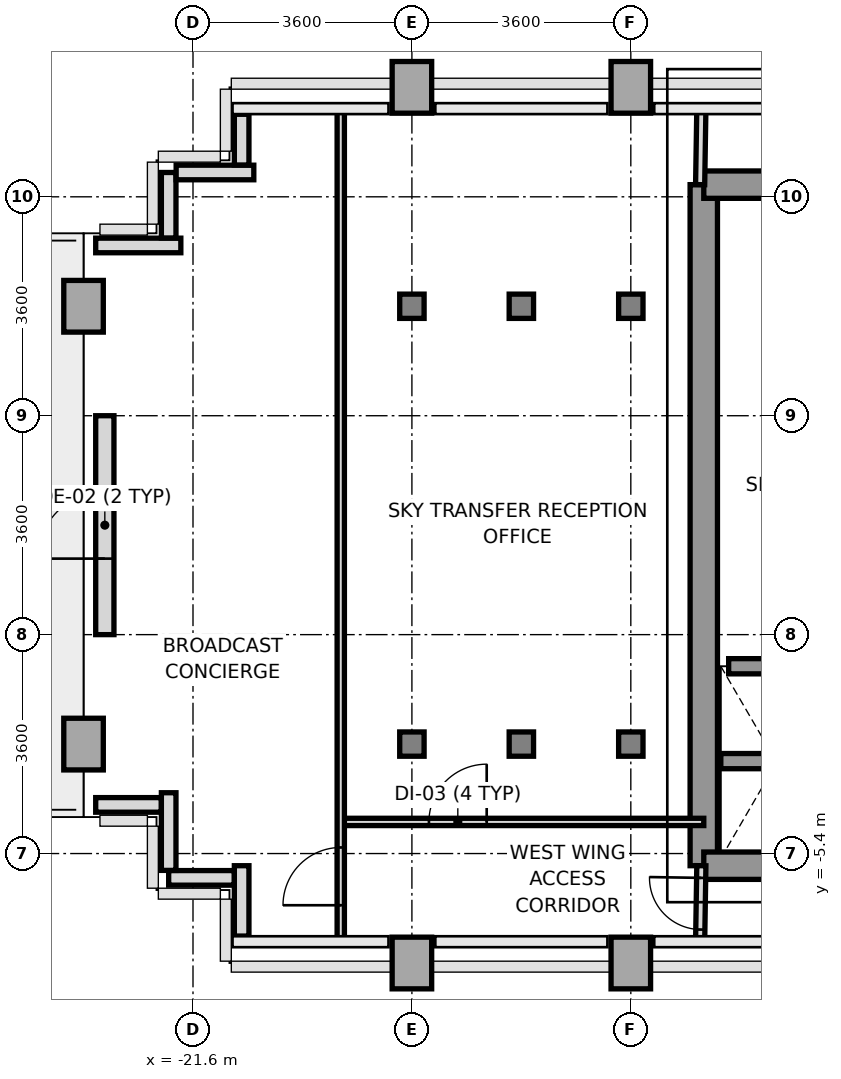
"""IFC4 building model, lengths in metres.
Left out: names, types, materials, properties, quantities, classifications, styles, units other than length and angle.
Written with IfcOpenShell. Run it as: python <this file> out.ifc"""

import sys

from ifc_helpers import new_model, si_unit, direction, frame, frame_2d, origin, origin_2d, place, context, subcontext, project, spatial, rectangle, i_section, extrude, source, transform, mapped, element, fill, save


model = new_model("IFC4")
c1 = context("Model", 3, precision=1e-05, world=origin(), true_north=direction((0.0, 1.0)))
c2 = subcontext(c1, "Body", "Model", "MODEL_VIEW")
j1 = project(units=[si_unit("LENGTHUNIT", "METRE"), si_unit("PLANEANGLEUNIT", "RADIAN")], contexts=[c1])
p1 = place(None, origin())
s1 = spatial("IfcSite", under=j1, at=p1, CompositionType="ELEMENT")
p2 = place(p1, origin())
s2 = spatial("IfcBuilding", under=s1, at=p2, CompositionType="ELEMENT")
p3 = place(p2, frame((0.0, 0.0, 93.0)))
s3 = spatial("IfcBuildingStorey", under=s2, at=p3, CompositionType="ELEMENT", Elevation=93.0)
m1 = source(origin(), c2, "Body", "SweptSolid", [
    extrude(rectangle(XDim=0.65, YDim=0.85, at=origin_2d()), origin(), (0.0, 0.0, 1.0), 4.0),
])
for number, where, z_axis, x_axis in (
    (1, (-23.4, -3.6, 0.0), (0.0, 0.0, 1.0), (1.0, 0.0, 0.0)),
    (2, (-23.4, 3.6, 0.0), (0.0, 0.0, 1.0), (1.0, 0.0, 0.0)),
    (3, (-18.0, -7.2, 0.0), (0.0, 0.0, 1.0), (1.0, 0.0, 0.0)),
):
    element("IfcColumn", number, at=place(p3, frame(where, z_axis=z_axis, x_axis=x_axis)), inside=s3, PredefinedType="COLUMN", context=c2, shape_type="MappedRepresentation", body=[
        mapped(m1, transform((0.0, 0.0, 0.0), x_axis=(1.0, 0.0, 0.0), y_axis=(0.0, 1.0, 0.0), z_axis=(0.0, 0.0, 1.0), scale=1.0)),
    ])
m2 = source(origin(), c2, "Body", "SweptSolid", [
    extrude(i_section(OverallWidth=0.401, OverallDepth=0.399, WebThickness=0.02, FlangeThickness=0.032, at=origin_2d()), origin(), (0.0, 0.0, 1.0), 4.0),
])
for number, where, z_axis, x_axis in (
    (4, (-18.0, -3.6, 0.0), (0.0, 0.0, 1.0), (1.0, 0.0, 0.0)),
    (5, (-18.0, 3.6, 0.0), (0.0, 0.0, 1.0), (1.0, 0.0, 0.0)),
):
    element("IfcColumn", number, at=place(p3, frame(where, z_axis=z_axis, x_axis=x_axis)), inside=s3, PredefinedType="COLUMN", context=c2, shape_type="MappedRepresentation", body=[
        mapped(m2, transform((0.0, 0.0, 0.0), x_axis=(1.0, 0.0, 0.0), y_axis=(0.0, 1.0, 0.0), z_axis=(0.0, 0.0, 1.0), scale=1.0)),
    ])
p4 = place(p3, frame((-18.0, 7.2, 0.0), z_axis=(0.0, 0.0, 1.0), x_axis=(1.0, 0.0, 0.0)))
e6 = element("IfcColumn", 6, at=p4, inside=s3, PredefinedType="COLUMN", context=c2, shape_type="MappedRepresentation", body=[
    mapped(m1, transform((0.0, 0.0, 0.0), x_axis=(1.0, 0.0, 0.0), y_axis=(0.0, 1.0, 0.0), z_axis=(0.0, 0.0, 1.0), scale=1.0)),
])
for number, where, z_axis, x_axis in (
    (7, (-16.2, -3.6, 0.0), (0.0, 0.0, 1.0), (1.0, 0.0, 0.0)),
    (8, (-16.2, 3.6, 0.0), (0.0, 0.0, 1.0), (1.0, 0.0, 0.0)),
):
    element("IfcColumn", number, at=place(p3, frame(where, z_axis=z_axis, x_axis=x_axis)), inside=s3, PredefinedType="COLUMN", context=c2, shape_type="MappedRepresentation", body=[
        mapped(m2, transform((0.0, 0.0, 0.0), x_axis=(1.0, 0.0, 0.0), y_axis=(0.0, 1.0, 0.0), z_axis=(0.0, 0.0, 1.0), scale=1.0)),
    ])
p5 = place(p3, frame((-14.4, -7.2, 0.0), z_axis=(0.0, 0.0, 1.0), x_axis=(1.0, 0.0, 0.0)))
e9 = element("IfcColumn", 9, at=p5, inside=s3, PredefinedType="COLUMN", context=c2, shape_type="MappedRepresentation", body=[
    mapped(m1, transform((0.0, 0.0, 0.0), x_axis=(1.0, 0.0, 0.0), y_axis=(0.0, 1.0, 0.0), z_axis=(0.0, 0.0, 1.0), scale=1.0)),
])
for number, where, z_axis, x_axis in (
    (10, (-14.4, -3.6, 0.0), (0.0, 0.0, 1.0), (1.0, 0.0, 0.0)),
    (11, (-14.4, 3.6, 0.0), (0.0, 0.0, 1.0), (1.0, 0.0, 0.0)),
):
    element("IfcColumn", number, at=place(p3, frame(where, z_axis=z_axis, x_axis=x_axis)), inside=s3, PredefinedType="COLUMN", context=c2, shape_type="MappedRepresentation", body=[
        mapped(m2, transform((0.0, 0.0, 0.0), x_axis=(1.0, 0.0, 0.0), y_axis=(0.0, 1.0, 0.0), z_axis=(0.0, 0.0, 1.0), scale=1.0)),
    ])
p6 = place(p3, frame((-14.4, 7.2, 0.0), z_axis=(0.0, 0.0, 1.0), x_axis=(1.0, 0.0, 0.0)))
e12 = element("IfcColumn", 12, at=p6, inside=s3, PredefinedType="COLUMN", context=c2, shape_type="MappedRepresentation", body=[
    mapped(m1, transform((0.0, 0.0, 0.0), x_axis=(1.0, 0.0, 0.0), y_axis=(0.0, 1.0, 0.0), z_axis=(0.0, 0.0, 1.0), scale=1.0)),
])
p7 = place(p3, frame((-23.05, -1.8, 0.0), z_axis=(0.0, 0.0, 1.0), x_axis=(0.0, 1.0, 0.0)))
e13 = element("IfcWall", 13, at=p7, inside=s3, PredefinedType="SOLIDWALL", context=c2, shape_type="SweptSolid", body=[
    extrude(rectangle(XDim=3.6, YDim=0.3, at=frame_2d((1.8, 0.0))), origin(), (0.0, 0.0, 1.0), 3.25),
])
p8 = place(p7, frame((1.25, 0.0, 0.0)))
e14 = element("IfcOpeningElement", 14, at=p8, cuts=e13, PredefinedType="OPENING", context=c2, shape_type="SweptSolid", body=[
    extrude(rectangle(XDim=1.1, YDim=2.3, at=frame_2d((0.55, 1.15))), frame((0.0, 0.16, 0.0), z_axis=(0.0, -1.0, 0.0), x_axis=(1.0, 0.0, 0.0)), (0.0, 0.0, 1.0), 0.32),
])
p9 = place(p3, frame((-20.8, -6.757, 0.0), z_axis=(0.0, 0.0, 1.0), x_axis=(0.0, 1.0, 0.0)))
e15 = element("IfcWall", 15, at=p9, inside=s3, PredefinedType="PARAPET", context=c2, shape_type="SweptSolid", body=[
    extrude(rectangle(XDim=1.157, YDim=0.24, at=frame_2d((0.579, 0.0))), origin(), (0.0, 0.0, 1.0), 1.15),
])
p10 = place(p3, frame((-20.923, -5.8, 0.0), z_axis=(0.0, 0.0, 1.0), x_axis=(-1.0, 0.0, 0.0)))
e16 = element("IfcWall", 16, at=p10, inside=s3, PredefinedType="PARAPET", context=c2, shape_type="SweptSolid", body=[
    extrude(rectangle(XDim=1.077, YDim=0.24, at=frame_2d((0.539, 0.0))), origin(), (0.0, 0.0, 1.0), 1.15),
])
p11 = place(p3, frame((-22.0, -5.677, 0.0), z_axis=(0.0, 0.0, 1.0), x_axis=(0.0, 1.0, 0.0)))
e17 = element("IfcWall", 17, at=p11, inside=s3, PredefinedType="PARAPET", context=c2, shape_type="SweptSolid", body=[
    extrude(rectangle(XDim=1.277, YDim=0.24, at=frame_2d((0.639, 0.0))), origin(), (0.0, 0.0, 1.0), 1.15),
])
p12 = place(p3, frame((-22.123, -4.6, 0.0), z_axis=(0.0, 0.0, 1.0), x_axis=(-1.0, 0.0, 0.0)))
e18 = element("IfcWall", 18, at=p12, inside=s3, PredefinedType="PARAPET", context=c2, shape_type="SweptSolid", body=[
    extrude(rectangle(XDim=1.077, YDim=0.24, at=frame_2d((0.539, 0.0))), origin(), (0.0, 0.0, 1.0), 1.15),
])
p13 = place(p3, frame((-23.2, 4.6, 0.0), z_axis=(0.0, 0.0, 1.0), x_axis=(1.0, 0.0, 0.0)))
e19 = element("IfcWall", 19, at=p13, inside=s3, PredefinedType="PARAPET", context=c2, shape_type="SweptSolid", body=[
    extrude(rectangle(XDim=1.4, YDim=0.24, at=frame_2d((0.7, 0.0))), origin(), (0.0, 0.0, 1.0), 1.15),
])
p14 = place(p3, frame((-22.0, 4.723, 0.0), z_axis=(0.0, 0.0, 1.0), x_axis=(0.0, 1.0, 0.0)))
e20 = element("IfcWall", 20, at=p14, inside=s3, PredefinedType="PARAPET", context=c2, shape_type="SweptSolid", body=[
    extrude(rectangle(XDim=1.077, YDim=0.24, at=frame_2d((0.539, 0.0))), origin(), (0.0, 0.0, 1.0), 1.15),
])
p15 = place(p3, frame((-21.877, 5.8, 0.0), z_axis=(0.0, 0.0, 1.0), x_axis=(1.0, 0.0, 0.0)))
e21 = element("IfcWall", 21, at=p15, inside=s3, PredefinedType="PARAPET", context=c2, shape_type="SweptSolid", body=[
    extrude(rectangle(XDim=1.277, YDim=0.24, at=frame_2d((0.638, 0.0))), origin(), (0.0, 0.0, 1.0), 1.15),
])
p16 = place(p3, frame((-20.8, 5.923, 0.0), z_axis=(0.0, 0.0, 1.0), x_axis=(0.0, 1.0, 0.0)))
e22 = element("IfcWall", 22, at=p16, inside=s3, PredefinedType="PARAPET", context=c2, shape_type="SweptSolid", body=[
    extrude(rectangle(XDim=0.834, YDim=0.24, at=frame_2d((0.417, 0.0))), origin(), (0.0, 0.0, 1.0), 1.15),
])
p17 = place(p3, frame((-13.2, -5.6, 0.0), z_axis=(0.0, 0.0, 1.0), x_axis=(0.0, 1.0, 0.0)))
e23 = element("IfcWall", 23, at=p17, inside=s3, PredefinedType="SHEAR", context=c2, shape_type="SweptSolid", body=[
    extrude(rectangle(XDim=11.2, YDim=0.45, at=frame_2d((5.6, 0.0))), origin(), (0.0, 0.0, 1.0), 4.0),
])
p18 = place(p3, frame((-13.2, 5.6, 0.0), z_axis=(0.0, 0.0, 1.0), x_axis=(1.0, 0.0, 0.0)))
e24 = element("IfcWall", 24, at=p18, inside=s3, PredefinedType="SHEAR", context=c2, shape_type="SweptSolid", body=[
    extrude(rectangle(XDim=1.819, YDim=0.45, at=frame_2d((0.909, 0.0))), origin(), (0.0, 0.0, 1.0), 4.0),
])
p19 = place(p3, frame((-13.2, -5.6, 0.0), z_axis=(0.0, 0.0, 1.0), x_axis=(1.0, 0.0, 0.0)))
e25 = element("IfcWall", 25, at=p19, inside=s3, PredefinedType="SHEAR", context=c2, shape_type="SweptSolid", body=[
    extrude(rectangle(XDim=7.8, YDim=0.45, at=frame_2d((3.9, 0.0))), origin(), (0.0, 0.0, 1.0), 4.0),
])
p20 = place(p19, frame((3.6, 0.0, 0.0)))
e26 = element("IfcOpeningElement", 26, at=p20, cuts=e25, PredefinedType="OPENING", context=c2, shape_type="SweptSolid", body=[
    extrude(rectangle(XDim=1.2, YDim=2.2, at=frame_2d((0.6, 1.1))), frame((0.0, 0.235, 0.0), z_axis=(0.0, -1.0, 0.0), x_axis=(1.0, 0.0, 0.0)), (0.0, 0.0, 1.0), 0.47),
])
p21 = place(p3, frame((-12.92, -3.88, 0.0), z_axis=(0.0, 0.0, 1.0), x_axis=(1.0, 0.0, 0.0)))
e27 = element("IfcWall", 27, at=p21, inside=s3, PredefinedType="SOLIDWALL", context=c2, shape_type="SweptSolid", body=[
    extrude(rectangle(XDim=1.84, YDim=0.25, at=frame_2d((0.92, 0.0))), origin(), (0.0, 0.0, 1.0), 4.0),
])
p22 = place(p3, frame((-12.791, -2.32, 0.0), z_axis=(0.0, 0.0, 1.0), x_axis=(1.0, 0.0, 0.0)))
e28 = element("IfcWall", 28, at=p22, inside=s3, PredefinedType="SOLIDWALL", context=c2, shape_type="SweptSolid", body=[
    extrude(rectangle(XDim=1.582, YDim=0.25, at=frame_2d((0.791, 0.0))), origin(), (0.0, 0.0, 1.0), 4.0),
])
p23 = place(p3, frame((-13.26, 5.6, 0.0), z_axis=(0.0, 0.0, 1.0), x_axis=(0.016013571389, 0.999871774545, 0.0)))
e29 = element("IfcWall", 29, at=p23, inside=s3, PredefinedType="PARTITIONING", context=c2, shape_type="SweptSolid", body=[
    extrude(rectangle(XDim=1.25, YDim=0.15, at=frame_2d((0.625, 0.0))), origin(), (0.0, 0.0, 1.0), 4.0),
])
p24 = place(p3, frame((-13.26, -6.85, 0.0), z_axis=(0.0, 0.0, 1.0), x_axis=(0.016013571389, 0.999871774545, 0.0)))
e30 = element("IfcWall", 30, at=p24, inside=s3, PredefinedType="PARTITIONING", context=c2, shape_type="SweptSolid", body=[
    extrude(rectangle(XDim=1.25, YDim=0.15, at=frame_2d((0.625, 0.0))), origin(), (0.0, 0.0, 1.0), 4.0),
])
p25 = place(p24, frame((0.2, 0.0, 0.0)))
e31 = element("IfcOpeningElement", 31, at=p25, cuts=e30, PredefinedType="OPENING", context=c2, shape_type="SweptSolid", body=[
    extrude(rectangle(XDim=0.85, YDim=2.1, at=frame_2d((0.425, 1.05))), frame((0.0, 0.085, 0.0), z_axis=(0.0, -1.0, 0.0), x_axis=(1.0, 0.0, 0.0)), (0.0, 0.0, 1.0), 0.17),
])
p26 = place(p3, frame((-19.17, -4.88, 0.0), z_axis=(0.0, 0.0, 1.0), x_axis=(1.0, 0.0, 0.0)))
e32 = element("IfcWall", 32, at=p26, inside=s3, PredefinedType="PARTITIONING", context=c2, shape_type="SweptSolid", body=[
    extrude(rectangle(XDim=5.97, YDim=0.12, at=frame_2d((2.985, 0.0))), origin(), (0.0, 0.0, 1.0), 3.55),
])
p27 = place(p26, frame((1.45, 0.0, 0.0)))
e33 = element("IfcOpeningElement", 33, at=p27, cuts=e32, PredefinedType="OPENING", context=c2, shape_type="SweptSolid", body=[
    extrude(rectangle(XDim=0.95, YDim=2.15, at=frame_2d((0.475, 1.075))), frame((0.0, 0.07, 0.0), z_axis=(0.0, -1.0, 0.0), x_axis=(1.0, 0.0, 0.0)), (0.0, 0.0, 1.0), 0.14),
])
p28 = place(p3, frame((-19.17, -6.85, 0.0), z_axis=(0.0, 0.0, 1.0), x_axis=(0.0, 1.0, 0.0)))
e34 = element("IfcWall", 34, at=p28, inside=s3, PredefinedType="PARTITIONING", context=c2, shape_type="SweptSolid", body=[
    extrude(rectangle(XDim=13.7, YDim=0.12, at=frame_2d((6.85, 0.0))), origin(), (0.0, 0.0, 1.0), 3.5),
])
p29 = place(p28, frame((0.6, 0.0, 0.0)))
e35 = element("IfcOpeningElement", 35, at=p29, cuts=e34, PredefinedType="OPENING", context=c2, shape_type="SweptSolid", body=[
    extrude(rectangle(XDim=0.95, YDim=2.15, at=frame_2d((0.475, 1.075))), frame((0.0, 0.07, 0.0), z_axis=(0.0, -1.0, 0.0), x_axis=(1.0, 0.0, 0.0)), (0.0, 0.0, 1.0), 0.14),
])
m3 = source(origin(), c2, "Body", "SweptSolid", [
    extrude(rectangle(XDim=1.1, YDim=2.3, at=frame_2d((0.55, 1.15))), frame((0.0, 0.025, 0.0), z_axis=(0.0, -1.0, 0.0), x_axis=(1.0, 0.0, 0.0)), (0.0, 0.0, 1.0), 0.05),
])
p30 = place(p8, origin())
e36 = element("IfcDoor", 36, at=p30, inside=s3, OperationType="SINGLE_SWING_LEFT", PredefinedType="DOOR", context=c2, shape_type="MappedRepresentation", body=[
    mapped(m3, transform((0.0, 0.0, 0.0), x_axis=(1.0, 0.0, 0.0), y_axis=(0.0, 1.0, 0.0), z_axis=(0.0, 0.0, 1.0), scale=1.0)),
])
fill(e14, e36)
m4 = source(origin(), c2, "Body", "SweptSolid", [
    extrude(rectangle(XDim=0.95, YDim=2.15, at=frame_2d((0.475, 1.075))), frame((0.0, 0.025, 0.0), z_axis=(0.0, -1.0, 0.0), x_axis=(1.0, 0.0, 0.0)), (0.0, 0.0, 1.0), 0.05),
])
p31 = place(p27, origin())
e37 = element("IfcDoor", 37, at=p31, inside=s3, OperationType="SINGLE_SWING_RIGHT", PredefinedType="DOOR", context=c2, shape_type="MappedRepresentation", body=[
    mapped(m4, transform((0.0, 0.0, 0.0), x_axis=(1.0, 0.0, 0.0), y_axis=(0.0, 1.0, 0.0), z_axis=(0.0, 0.0, 1.0), scale=1.0)),
])
fill(e33, e37)
p32 = place(p29, origin())
e38 = element("IfcDoor", 38, at=p32, inside=s3, OperationType="SINGLE_SWING_LEFT", PredefinedType="DOOR", context=c2, shape_type="MappedRepresentation", body=[
    mapped(m4, transform((0.0, 0.0, 0.0), x_axis=(1.0, 0.0, 0.0), y_axis=(0.0, 1.0, 0.0), z_axis=(0.0, 0.0, 1.0), scale=1.0)),
])
fill(e35, e38)
m5 = source(origin(), c2, "Body", "SweptSolid", [
    extrude(rectangle(XDim=0.85, YDim=2.1, at=frame_2d((0.425, 1.05))), frame((0.0, 0.025, 0.0), z_axis=(0.0, -1.0, 0.0), x_axis=(1.0, 0.0, 0.0)), (0.0, 0.0, 1.0), 0.05),
])
p33 = place(p25, origin())
e39 = element("IfcDoor", 39, at=p33, inside=s3, OperationType="SINGLE_SWING_RIGHT", PredefinedType="DOOR", context=c2, shape_type="MappedRepresentation", body=[
    mapped(m5, transform((0.0, 0.0, 0.0), x_axis=(1.0, 0.0, 0.0), y_axis=(0.0, 1.0, 0.0), z_axis=(0.0, 0.0, 1.0), scale=1.0)),
])
fill(e31, e39)
save(model, sys.argv[1])
